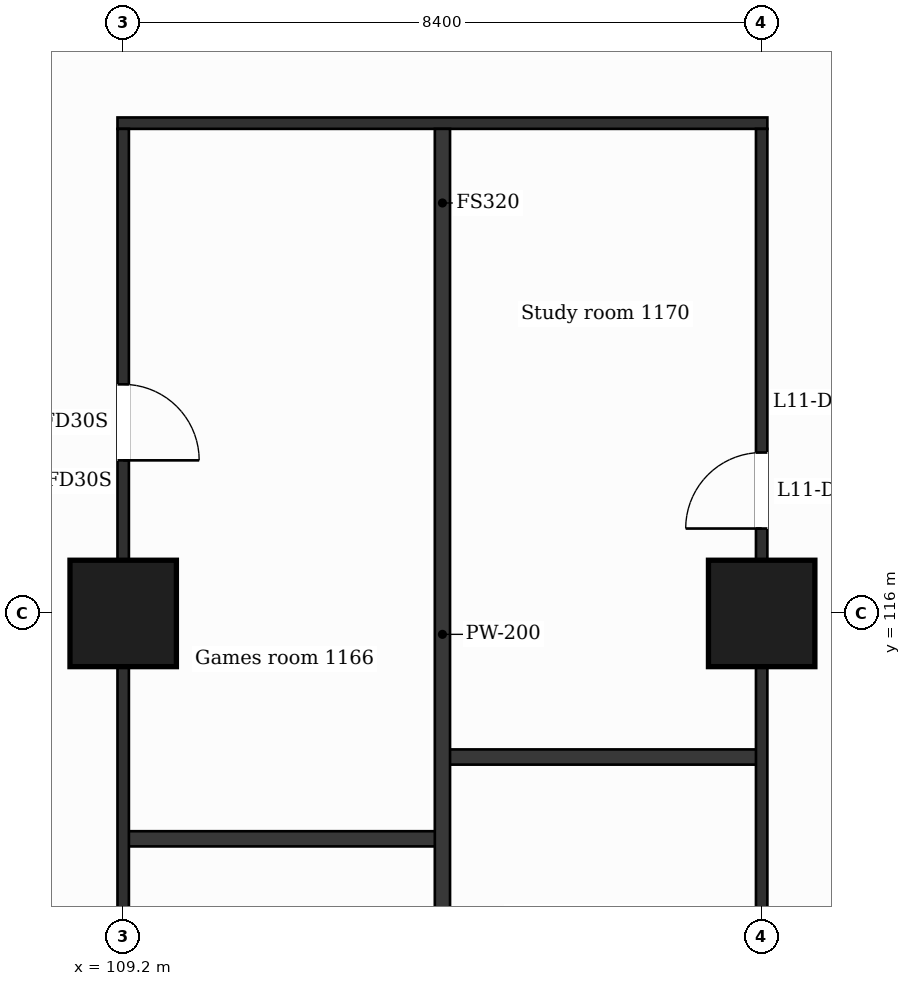
"""IFC4 building model, lengths in metres.
Left out: names, types, materials, properties, quantities, classifications, styles, units other than length and angle.
Written with IfcOpenShell. Run it as: python <this file> out.ifc"""

import sys

from ifc_helpers import new_model, si_unit, direction, frame, frame_2d, origin, origin_2d, place, context, subcontext, project, spatial, rectangle, extrude, element, fill, save


model = new_model("IFC4")
c1 = context("Model", 3, precision=1e-05, world=origin(), true_north=direction((0.0, 1.0)))
c2 = subcontext(c1, "Body", "Model", "MODEL_VIEW")
j1 = project(units=[si_unit("LENGTHUNIT", "METRE"), si_unit("PLANEANGLEUNIT", "RADIAN")], contexts=[c1])
p1 = place(None, origin())
s1 = spatial("IfcSite", under=j1, at=p1, CompositionType="ELEMENT")
p2 = place(p1, origin())
s2 = spatial("IfcBuilding", under=s1, at=p2, CompositionType="ELEMENT")
p3 = place(p2, frame((0.0, 0.0, 56.5)))
s3 = spatial("IfcBuildingStorey", under=s2, at=p3, CompositionType="ELEMENT", Elevation=56.5)
for number, where, z_axis, x_axis in (
    (1, (109.2, 116.0, 0.0), (0.0, 0.0, 1.0), (1.0, 0.0, 0.0)),
    (2, (117.6, 116.0, 0.0), (0.0, 0.0, 1.0), (1.0, 0.0, 0.0)),
):
    element("IfcColumn", number, at=place(p3, frame(where, z_axis=z_axis, x_axis=x_axis)), inside=s3, PredefinedType="COLUMN", context=c2, shape_type="SweptSolid", body=[
        extrude(rectangle(XDim=1.4, YDim=1.4, at=origin_2d()), origin(), (0.0, 0.0, 1.0), 3.5),
    ])
p4 = place(p3, frame((109.2, 113.035, 0.0), z_axis=(0.0, 0.0, 1.0), x_axis=(1.0, 0.0, 0.0)))
e3 = element("IfcWall", 3, at=p4, inside=s3, PredefinedType="PARTITIONING", context=c2, shape_type="SweptSolid", body=[
    extrude(rectangle(XDim=4.2, YDim=0.2, at=frame_2d((2.1, 0.0))), origin(), (0.0, 0.0, 1.0), 3.18),
])
p5 = place(p3, frame((113.4, 114.111, 0.0), z_axis=(0.0, 0.0, 1.0), x_axis=(1.0, 0.0, 0.0)))
e4 = element("IfcWall", 4, at=p5, inside=s3, PredefinedType="PARTITIONING", context=c2, shape_type="SweptSolid", body=[
    extrude(rectangle(XDim=4.2, YDim=0.2, at=frame_2d((2.1, 0.0))), origin(), (0.0, 0.0, 1.0), 3.18),
])
p6 = place(p3, frame((109.125, 122.45, 0.0), z_axis=(0.0, 0.0, 1.0), x_axis=(1.0, 0.0, 0.0)))
e5 = element("IfcWall", 5, at=p6, inside=s3, PredefinedType="PARTITIONING", context=c2, shape_type="SweptSolid", body=[
    extrude(rectangle(XDim=8.55, YDim=0.15, at=frame_2d((4.275, 0.0))), origin(), (0.0, 0.0, 1.0), 3.18),
])
p7 = place(p3, frame((109.2, 109.075, 0.0), z_axis=(0.0, 0.0, 1.0), x_axis=(0.0, 1.0, 0.0)))
e6 = element("IfcWall", 6, at=p7, inside=s3, PredefinedType="PARTITIONING", context=c2, shape_type="SweptSolid", body=[
    extrude(rectangle(XDim=13.3, YDim=0.15, at=frame_2d((6.65, 0.0))), origin(), (0.0, 0.0, 1.0), 3.18),
])
p8 = place(p7, frame((8.939, 0.0, 0.0)))
e7 = element("IfcOpeningElement", 7, at=p8, cuts=e6, PredefinedType="OPENING", context=c2, shape_type="SweptSolid", body=[
    extrude(rectangle(XDim=1.0, YDim=2.1, at=frame_2d((0.5, 1.05))), frame((0.0, 0.085, 0.0), z_axis=(0.0, -1.0, 0.0), x_axis=(1.0, 0.0, 0.0)), (0.0, 0.0, 1.0), 0.17),
])
p9 = place(p3, frame((113.4, 109.075, 0.0), z_axis=(0.0, 0.0, 1.0), x_axis=(0.0, 1.0, 0.0)))
e8 = element("IfcWall", 8, at=p9, inside=s3, PredefinedType="PARTITIONING", context=c2, shape_type="SweptSolid", body=[
    extrude(rectangle(XDim=13.3, YDim=0.2, at=frame_2d((6.65, 0.0))), origin(), (0.0, 0.0, 1.0), 3.18),
])
p10 = place(p3, frame((117.6, 109.075, 0.0), z_axis=(0.0, 0.0, 1.0), x_axis=(0.0, 1.0, 0.0)))
e9 = element("IfcWall", 9, at=p10, inside=s3, PredefinedType="PARTITIONING", context=c2, shape_type="SweptSolid", body=[
    extrude(rectangle(XDim=13.3, YDim=0.15, at=frame_2d((6.65, 0.0))), origin(), (0.0, 0.0, 1.0), 3.18),
])
p11 = place(p10, frame((8.042, 0.0, 0.0)))
e10 = element("IfcOpeningElement", 10, at=p11, cuts=e9, PredefinedType="OPENING", context=c2, shape_type="SweptSolid", body=[
    extrude(rectangle(XDim=1.0, YDim=2.1, at=frame_2d((0.5, 1.05))), frame((0.0, 0.085, 0.0), z_axis=(0.0, -1.0, 0.0), x_axis=(1.0, 0.0, 0.0)), (0.0, 0.0, 1.0), 0.17),
])
p12 = place(p8, origin())
e11 = element("IfcDoor", 11, at=p12, inside=s3, OperationType="SINGLE_SWING_LEFT", PredefinedType="DOOR", context=c2, shape_type="SweptSolid", body=[
    extrude(rectangle(XDim=1.0, YDim=2.1, at=frame_2d((0.5, 1.05))), frame((0.0, 0.025, 0.0), z_axis=(0.0, -1.0, 0.0), x_axis=(1.0, 0.0, 0.0)), (0.0, 0.0, 1.0), 0.05),
])
fill(e7, e11)
p13 = place(p11, origin())
e12 = element("IfcDoor", 12, at=p13, inside=s3, OperationType="SINGLE_SWING_LEFT", PredefinedType="DOOR", context=c2, shape_type="SweptSolid", body=[
    extrude(rectangle(XDim=1.0, YDim=2.1, at=frame_2d((0.5, 1.05))), frame((0.0, 0.025, 0.0), z_axis=(0.0, -1.0, 0.0), x_axis=(1.0, 0.0, 0.0)), (0.0, 0.0, 1.0), 0.05),
])
fill(e10, e12)
save(model, sys.argv[1])
